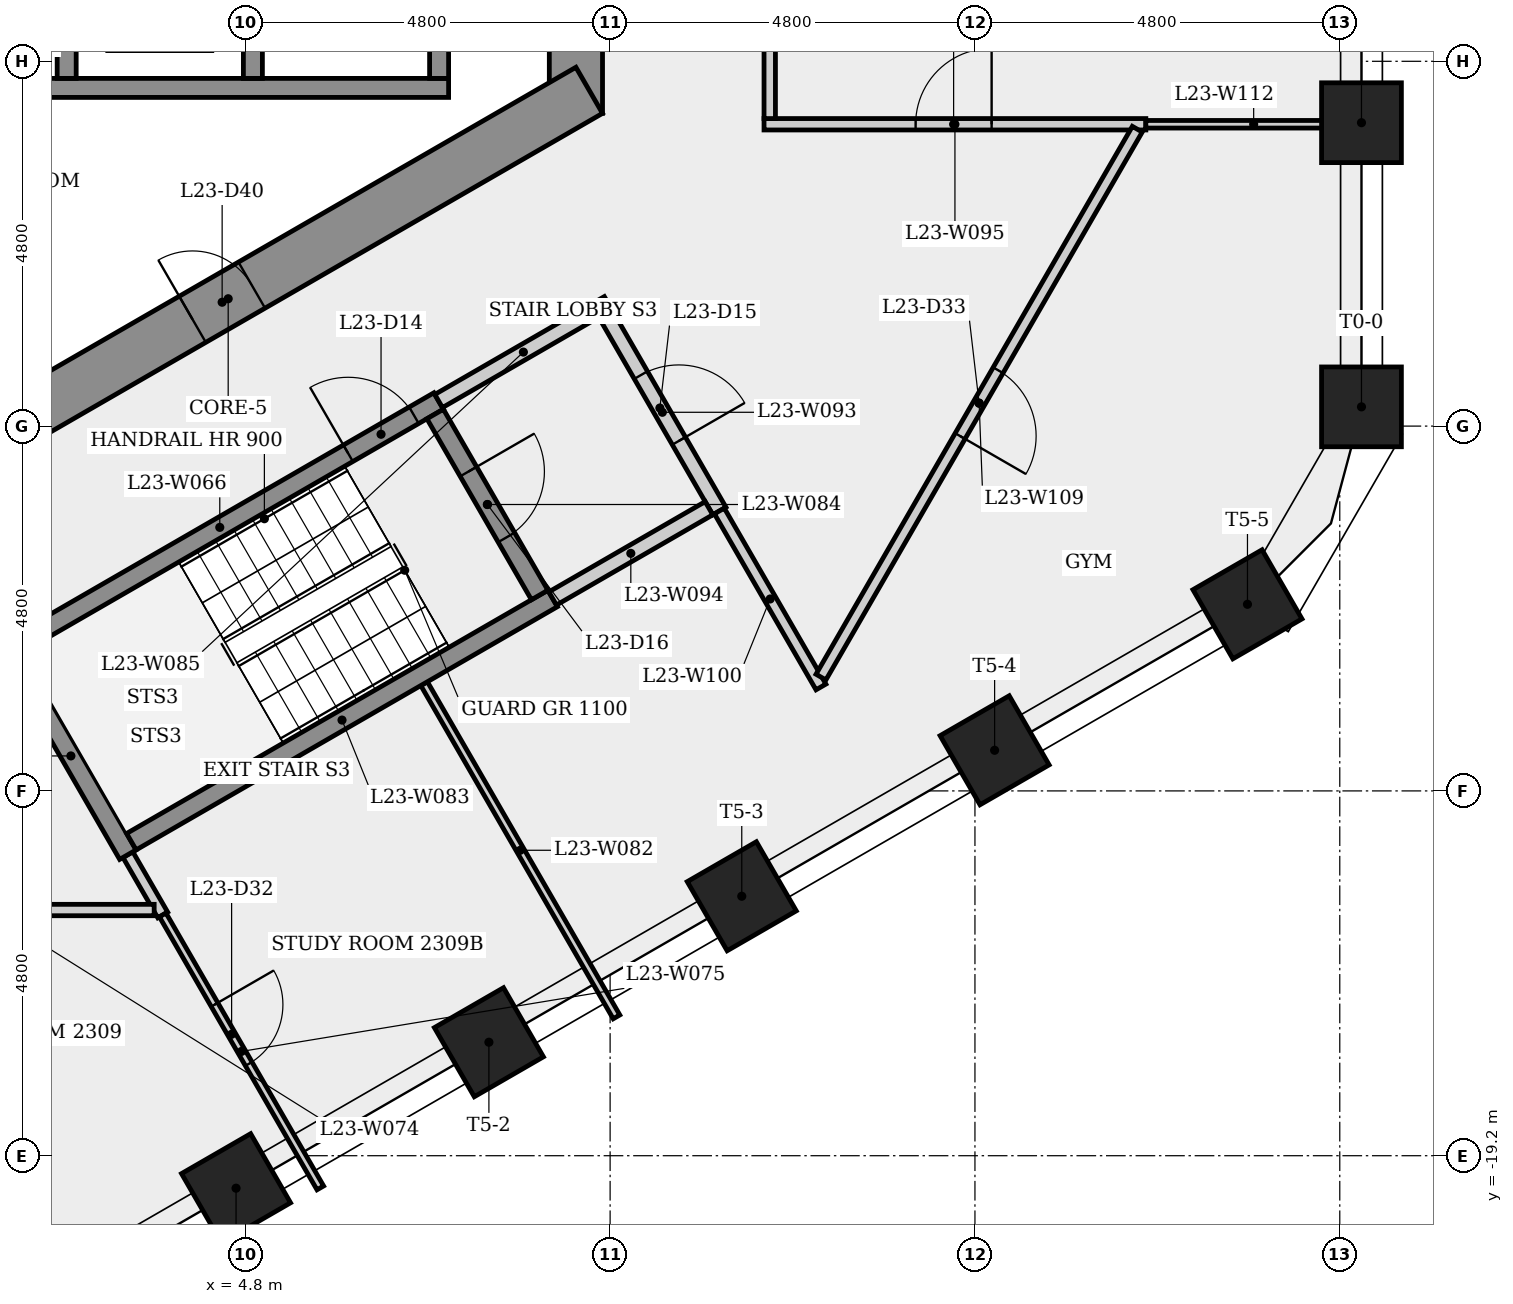
"""IFC4 building model, lengths in metres.
Left out: names, types, materials, properties, quantities, classifications, styles, units other than length and angle.
Written with IfcOpenShell. Run it as: python <this file> out.ifc"""

import sys

from ifc_helpers import new_model, si_unit, direction, frame, frame_2d, origin, origin_2d, place, context, subcontext, project, spatial, rectangle, extrude, element, fill, save


model = new_model("IFC4")
c1 = context("Model", 3, precision=1e-05, world=origin(), true_north=direction((0.0, 1.0)))
c2 = subcontext(c1, "Body", "Model", "MODEL_VIEW")
j1 = project(units=[si_unit("LENGTHUNIT", "METRE"), si_unit("PLANEANGLEUNIT", "RADIAN")], contexts=[c1])
p1 = place(None, origin())
s1 = spatial("IfcSite", under=j1, at=p1, CompositionType="ELEMENT")
p2 = place(p1, origin())
s2 = spatial("IfcBuilding", under=s1, at=p2, CompositionType="ELEMENT")
p3 = place(p2, frame((0.0, 0.0, 89.9)))
s3 = spatial("IfcBuildingStorey", under=s2, at=p3, CompositionType="ELEMENT", Elevation=89.9)
p4 = place(p3, frame((9.15, -5.485, 0.0), z_axis=(0.0, 0.0, 1.0), x_axis=(0.0, 1.0, 0.0)))
e1 = element("IfcWall", 1, at=p4, inside=s3, PredefinedType="SHEAR", context=c2, shape_type="SweptSolid", body=[
    extrude(rectangle(XDim=10.97, YDim=0.7, at=frame_2d((5.485, 0.0))), origin(), (0.0, 0.0, 1.0), 3.4),
])
p5 = place(p4, frame((4.685, 0.0, 0.0)))
e2 = element("IfcOpeningElement", 2, at=p5, cuts=e1, PredefinedType="OPENING", context=c2, shape_type="SweptSolid", body=[
    extrude(rectangle(XDim=1.6, YDim=2.1, at=frame_2d((0.8, 1.05))), frame((0.0, 0.36, 0.0), z_axis=(0.0, -1.0, 0.0), x_axis=(1.0, 0.0, 0.0)), (0.0, 0.0, 1.0), 0.72),
])
p6 = place(p3, frame((-0.175, -10.667, 0.0), z_axis=(0.0, 0.0, 1.0), x_axis=(0.866023993627, 0.500002442456, 0.0)))
e3 = element("IfcWall", 3, at=p6, inside=s3, PredefinedType="SHEAR", context=c2, shape_type="SweptSolid", body=[
    extrude(rectangle(XDim=10.97, YDim=0.7, at=frame_2d((5.485, 0.0))), origin(), (0.0, 0.0, 1.0), 3.4),
])
p7 = place(p6, frame((4.943, 0.0, 0.0)))
e4 = element("IfcOpeningElement", 4, at=p7, cuts=e3, PredefinedType="OPENING", context=c2, shape_type="SweptSolid", body=[
    extrude(rectangle(XDim=0.9, YDim=2.1, at=frame_2d((0.45, 1.05))), frame((0.0, 0.36, 0.0), z_axis=(0.0, -1.0, 0.0), x_axis=(1.0, 0.0, 0.0)), (0.0, 0.0, 1.0), 0.72),
])
for number, where, z_axis, x_axis in (
    (5, (19.486, -9.347, 0.0), (0.0, 0.0, 1.0), (1.0, 0.0, 0.0)),
    (6, (19.486, -5.608, 0.0), (0.0, 0.0, 1.0), (1.0, 0.0, 0.0)),
    (7, (4.678, -19.628, 0.0), (0.0, 0.0, 1.0), (0.5, -0.866, 0.0)),
    (8, (8.005, -17.707, 0.0), (0.0, 0.0, 1.0), (0.5, -0.866, 0.0)),
    (9, (11.332, -15.786, 0.0), (0.0, 0.0, 1.0), (0.5, -0.866, 0.0)),
    (10, (14.659, -13.865, 0.0), (0.0, 0.0, 1.0), (0.5, -0.866, 0.0)),
    (11, (17.986, -11.945, 0.0), (0.0, 0.0, 1.0), (0.5, -0.866, 0.0)),
):
    element("IfcColumn", number, at=place(p3, frame(where, z_axis=z_axis, x_axis=x_axis)), inside=s3, PredefinedType="COLUMN", context=c2, shape_type="SweptSolid", body=[
        extrude(rectangle(XDim=1.05, YDim=1.05, at=origin_2d()), origin(), (0.0, 0.0, 1.0), 3.4),
    ])
p8 = place(p3, frame((-7.225, -5.15, 0.0), z_axis=(0.0, 0.0, 1.0), x_axis=(1.0, 0.0, 0.0)))
e12 = element("IfcWall", 12, at=p8, inside=s3, PredefinedType="SHEAR", context=c2, shape_type="SweptSolid", body=[
    extrude(rectangle(XDim=14.7, YDim=0.25, at=frame_2d((7.35, 0.0))), origin(), (0.0, 0.0, 1.0), 3.05),
])
p9 = place(p3, frame((1.585, -12.595, 0.0), z_axis=(0.0, 0.0, 1.0), x_axis=(0.866036417653, 0.499980922934, 0.0)))
e13 = element("IfcWall", 13, at=p9, inside=s3, PredefinedType="SHEAR", context=c2, shape_type="SweptSolid", body=[
    extrude(rectangle(XDim=6.65, YDim=0.25, at=frame_2d((3.325, 0.0))), origin(), (0.0, 0.0, 1.0), 3.05),
])
p10 = place(p9, frame((5.275, 0.0, 0.0)))
e14 = element("IfcOpeningElement", 14, at=p10, cuts=e13, PredefinedType="OPENING", context=c2, shape_type="SweptSolid", body=[
    extrude(rectangle(XDim=1.0, YDim=2.1, at=frame_2d((0.5, 1.05))), frame((0.0, 0.135, 0.0), z_axis=(0.0, -1.0, 0.0), x_axis=(1.0, 0.0, 0.0)), (0.0, 0.0, 1.0), 0.27),
])
p11 = place(p3, frame((2.45, -1.925, 0.0), z_axis=(0.0, 0.0, 1.0), x_axis=(0.0, -1.0, 0.0)))
e15 = element("IfcWall", 15, at=p11, inside=s3, PredefinedType="SHEAR", context=c2, shape_type="SweptSolid", body=[
    extrude(rectangle(XDim=3.1, YDim=0.25, at=frame_2d((1.55, 0.0))), origin(), (0.0, 0.0, 1.0), 3.4),
])
p12 = place(p3, frame((3.256, -15.239, 0.0), z_axis=(0.0, 0.0, 1.0), x_axis=(0.499922376475, -0.866070215109, 0.0)))
e16 = element("IfcWall", 16, at=p12, inside=s3, PredefinedType="PARTITIONING", context=c2, shape_type="SweptSolid", body=[
    extrude(rectangle(XDim=0.916, YDim=0.15, at=frame_2d((0.458, 0.0))), origin(), (0.0, 0.0, 1.0), 3.05),
])
p13 = place(p3, frame((3.256, -15.239, 0.0), z_axis=(0.0, 0.0, 1.0), x_axis=(-0.50002537861, 0.866010750942, 0.0)))
e17 = element("IfcWall", 17, at=p13, inside=s3, PredefinedType="SHEAR", context=c2, shape_type="SweptSolid", body=[
    extrude(rectangle(XDim=3.0, YDim=0.25, at=frame_2d((1.5, 0.0))), origin(), (0.0, 0.0, 1.0), 3.05),
])
p14 = place(p3, frame((3.601, -15.967, 0.0), z_axis=(0.0, 0.0, 1.0), x_axis=(-1.0, 0.0, 0.0)))
e18 = element("IfcWall", 18, at=p14, inside=s3, PredefinedType="PARTITIONING", context=c2, shape_type="SweptSolid", body=[
    extrude(rectangle(XDim=4.381, YDim=0.15, at=frame_2d((2.19, 0.0))), origin(), (0.0, 0.0, 1.0), 3.05),
])
p15 = place(p14, frame((1.691, 0.0, 0.0)))
e19 = element("IfcOpeningElement", 19, at=p15, cuts=e18, PredefinedType="OPENING", context=c2, shape_type="SweptSolid", body=[
    extrude(rectangle(XDim=1.0, YDim=2.1, at=frame_2d((0.5, 1.05))), frame((0.0, 0.085, 0.0), z_axis=(0.0, -1.0, 0.0), x_axis=(1.0, 0.0, 0.0)), (0.0, 0.0, 1.0), 0.17),
])
p16 = place(p3, frame((3.714, -16.032, 0.0), z_axis=(0.0, 0.0, 1.0), x_axis=(0.500033333293, -0.866006157943, 0.0)))
e20 = element("IfcWall", 20, at=p16, inside=s3, PredefinedType="PARTITIONING", context=c2, shape_type="SweptSolid", body=[
    extrude(rectangle(XDim=4.147, YDim=0.1, at=frame_2d((2.073, 0.0))), origin(), (0.0, 0.0, 1.0), 3.05),
])
p17 = place(p16, frame((1.363, 0.0, 0.0)))
e21 = element("IfcOpeningElement", 21, at=p17, cuts=e20, PredefinedType="OPENING", context=c2, shape_type="SweptSolid", body=[
    extrude(rectangle(XDim=0.9, YDim=2.1, at=frame_2d((0.45, 1.05))), frame((0.0, 0.06, 0.0), z_axis=(0.0, -1.0, 0.0), x_axis=(1.0, 0.0, 0.0)), (0.0, 0.0, 1.0), 0.12),
])
p18 = place(p3, frame((4.9, -1.925, 0.0), z_axis=(0.0, 0.0, 1.0), x_axis=(0.0, -1.0, 0.0)))
e22 = element("IfcWall", 22, at=p18, inside=s3, PredefinedType="SHEAR", context=c2, shape_type="SweptSolid", body=[
    extrude(rectangle(XDim=3.1, YDim=0.25, at=frame_2d((1.55, 0.0))), origin(), (0.0, 0.0, 1.0), 3.4),
])
p19 = place(p3, frame((7.153, -12.989, 0.0), z_axis=(0.0, 0.0, 1.0), x_axis=(0.500013255511, -0.866017750576, 0.0)))
e23 = element("IfcWall", 23, at=p19, inside=s3, PredefinedType="PARTITIONING", context=c2, shape_type="SweptSolid", body=[
    extrude(rectangle(XDim=5.063, YDim=0.1, at=frame_2d((2.531, 0.0))), origin(), (0.0, 0.0, 1.0), 3.05),
])
p20 = place(p3, frame((3.301, -15.068, 0.0), z_axis=(0.0, 0.0, 1.0), x_axis=(0.866035036182, 0.499983315828, 0.0)))
e24 = element("IfcWall", 24, at=p20, inside=s3, PredefinedType="SHEAR", context=c2, shape_type="SweptSolid", body=[
    extrude(rectangle(XDim=6.4, YDim=0.25, at=frame_2d((3.2, 0.0))), origin(), (0.0, 0.0, 1.0), 3.05),
])
p21 = place(p3, frame((7.298, -9.441, 0.0), z_axis=(0.0, 0.0, 1.0), x_axis=(0.500034990121, -0.866005201286, 0.0)))
e25 = element("IfcWall", 25, at=p21, inside=s3, PredefinedType="SHEAR", context=c2, shape_type="SweptSolid", body=[
    extrude(rectangle(XDim=2.75, YDim=0.25, at=frame_2d((1.375, 0.0))), origin(), (0.0, 0.0, 1.0), 3.05),
])
p22 = place(p21, frame((0.875, 0.0, 0.0)))
e26 = element("IfcOpeningElement", 26, at=p22, cuts=e25, PredefinedType="OPENING", context=c2, shape_type="SweptSolid", body=[
    extrude(rectangle(XDim=1.0, YDim=2.1, at=frame_2d((0.5, 1.05))), frame((0.0, 0.135, 0.0), z_axis=(0.0, -1.0, 0.0), x_axis=(1.0, 0.0, 0.0)), (0.0, 0.0, 1.0), 0.27),
])
p23 = place(p3, frame((7.344, -9.27, 0.0), z_axis=(0.0, 0.0, 1.0), x_axis=(0.866005588531, 0.500034319456, 0.0)))
e27 = element("IfcWall", 27, at=p23, inside=s3, PredefinedType="PARTITIONING", context=c2, shape_type="SweptSolid", body=[
    extrude(rectangle(XDim=2.575, YDim=0.2, at=frame_2d((1.288, 0.0))), origin(), (0.0, 0.0, 1.0), 3.05),
])
p24 = place(p3, frame((7.35, -1.925, 0.0), z_axis=(0.0, 0.0, 1.0), x_axis=(0.0, -1.0, 0.0)))
e28 = element("IfcWall", 28, at=p24, inside=s3, PredefinedType="SHEAR", context=c2, shape_type="SweptSolid", body=[
    extrude(rectangle(XDim=3.1, YDim=0.25, at=frame_2d((1.55, 0.0))), origin(), (0.0, 0.0, 1.0), 3.4),
])
p25 = place(p3, frame((9.537, -8.119, 0.0), z_axis=(0.0, 0.0, 1.0), x_axis=(0.499990139034, -0.866031096941, 0.0)))
e29 = element("IfcWall", 29, at=p25, inside=s3, PredefinedType="PARTITIONING", context=c2, shape_type="SweptSolid", body=[
    extrude(rectangle(XDim=3.0, YDim=0.2, at=frame_2d((1.5, 0.0))), origin(), (0.0, 0.0, 1.0), 3.05),
])
p26 = place(p25, frame((0.935, 0.0, 0.0)))
e30 = element("IfcOpeningElement", 30, at=p26, cuts=e29, PredefinedType="OPENING", context=c2, shape_type="SweptSolid", body=[
    extrude(rectangle(XDim=1.0, YDim=2.1, at=frame_2d((0.5, 1.05))), frame((0.0, 0.11, 0.0), z_axis=(0.0, -1.0, 0.0), x_axis=(1.0, 0.0, 0.0)), (0.0, 0.0, 1.0), 0.22),
])
p27 = place(p3, frame((10.901, -10.681, 0.0), z_axis=(0.0, 0.0, 1.0), x_axis=(-0.866007538022, -0.500030943131, 0.0)))
e31 = element("IfcWall", 31, at=p27, inside=s3, PredefinedType="PARTITIONING", context=c2, shape_type="SweptSolid", body=[
    extrude(rectangle(XDim=2.375, YDim=0.2, at=frame_2d((1.188, 0.0))), origin(), (0.0, 0.0, 1.0), 3.05),
])
p28 = place(p3, frame((11.625, -5.628, 0.0), z_axis=(0.0, 0.0, 1.0), x_axis=(1.0, 0.0, 0.0)))
e32 = element("IfcWall", 32, at=p28, inside=s3, PredefinedType="PARTITIONING", context=c2, shape_type="SweptSolid", body=[
    extrude(rectangle(XDim=5.023, YDim=0.15, at=frame_2d((2.512, 0.0))), origin(), (0.0, 0.0, 1.0), 3.05),
])
p29 = place(p28, frame((1.994, 0.0, 0.0)))
e33 = element("IfcOpeningElement", 33, at=p29, cuts=e32, PredefinedType="OPENING", context=c2, shape_type="SweptSolid", body=[
    extrude(rectangle(XDim=1.0, YDim=2.1, at=frame_2d((0.5, 1.05))), frame((0.0, 0.085, 0.0), z_axis=(0.0, -1.0, 0.0), x_axis=(1.0, 0.0, 0.0)), (0.0, 0.0, 1.0), 0.17),
])
p30 = place(p3, frame((11.7, -5.553, 0.0), z_axis=(0.0, 0.0, 1.0), x_axis=(0.0, 1.0, 0.0)))
e34 = element("IfcWall", 34, at=p30, inside=s3, PredefinedType="PARTITIONING", context=c2, shape_type="SweptSolid", body=[
    extrude(rectangle(XDim=10.757, YDim=0.15, at=frame_2d((5.378, 0.0))), origin(), (0.0, 0.0, 1.0), 3.05),
])
p31 = place(p30, frame((5.053, 0.0, 0.0)))
e35 = element("IfcOpeningElement", 35, at=p31, cuts=e34, PredefinedType="OPENING", context=c2, shape_type="SweptSolid", body=[
    extrude(rectangle(XDim=1.0, YDim=2.1, at=frame_2d((0.5, 1.05))), frame((0.0, 0.085, 0.0), z_axis=(0.0, -1.0, 0.0), x_axis=(1.0, 0.0, 0.0)), (0.0, 0.0, 1.0), 0.17),
])
p32 = place(p3, frame((12.374, -13.032, 0.0), z_axis=(0.0, 0.0, 1.0), x_axis=(-0.499999136801, 0.866025902152, 0.0)))
e36 = element("IfcWall", 36, at=p32, inside=s3, PredefinedType="PARTITIONING", context=c2, shape_type="SweptSolid", body=[
    extrude(rectangle(XDim=2.673, YDim=0.15, at=frame_2d((1.337, 0.0))), origin(), (0.0, 0.0, 1.0), 3.05),
])
p33 = place(p3, frame((16.536, -5.694, 0.0), z_axis=(0.0, 0.0, 1.0), x_axis=(-0.49999073022, -0.866030755628, 0.0)))
e37 = element("IfcWall", 37, at=p33, inside=s3, PredefinedType="PARTITIONING", context=c2, shape_type="SweptSolid", body=[
    extrude(rectangle(XDim=8.324, YDim=0.15, at=frame_2d((4.162, 0.0))), origin(), (0.0, 0.0, 1.0), 3.05),
])
p34 = place(p33, frame((3.662, 0.0, 0.0)))
e38 = element("IfcOpeningElement", 38, at=p34, cuts=e37, PredefinedType="OPENING", context=c2, shape_type="SweptSolid", body=[
    extrude(rectangle(XDim=1.0, YDim=2.1, at=frame_2d((0.5, 1.05))), frame((0.0, 0.085, 0.0), z_axis=(0.0, -1.0, 0.0), x_axis=(1.0, 0.0, 0.0)), (0.0, 0.0, 1.0), 0.17),
])
p35 = place(p3, frame((19.486, -5.628, 0.0), z_axis=(0.0, 0.0, 1.0), x_axis=(-1.0, 0.0, 0.0)))
e39 = element("IfcWall", 39, at=p35, inside=s3, PredefinedType="PARTITIONING", context=c2, shape_type="SweptSolid", body=[
    extrude(rectangle(XDim=2.837, YDim=0.1, at=frame_2d((1.418, 0.0))), origin(), (0.0, 0.0, 1.0), 3.05),
])
p36 = place(p10, origin())
e40 = element("IfcDoor", 40, at=p36, inside=s3, OperationType="SINGLE_SWING_LEFT", PredefinedType="DOOR", context=c2, shape_type="SweptSolid", body=[
    extrude(rectangle(XDim=1.0, YDim=2.1, at=frame_2d((0.5, 1.05))), frame((0.0, 0.025, 0.0), z_axis=(0.0, -1.0, 0.0), x_axis=(1.0, 0.0, 0.0)), (0.0, 0.0, 1.0), 0.05),
])
fill(e14, e40)
p37 = place(p26, origin())
e41 = element("IfcDoor", 41, at=p37, inside=s3, OperationType="SINGLE_SWING_RIGHT", PredefinedType="DOOR", context=c2, shape_type="SweptSolid", body=[
    extrude(rectangle(XDim=1.0, YDim=2.1, at=frame_2d((0.5, 1.05))), frame((0.0, 0.025, 0.0), z_axis=(0.0, -1.0, 0.0), x_axis=(1.0, 0.0, 0.0)), (0.0, 0.0, 1.0), 0.05),
])
fill(e30, e41)
p38 = place(p22, origin())
e42 = element("IfcDoor", 42, at=p38, inside=s3, OperationType="SINGLE_SWING_LEFT", PredefinedType="DOOR", context=c2, shape_type="SweptSolid", body=[
    extrude(rectangle(XDim=1.0, YDim=2.1, at=frame_2d((0.5, 1.05))), frame((0.0, 0.025, 0.0), z_axis=(0.0, -1.0, 0.0), x_axis=(1.0, 0.0, 0.0)), (0.0, 0.0, 1.0), 0.05),
])
fill(e26, e42)
p39 = place(p29, origin())
e43 = element("IfcDoor", 43, at=p39, inside=s3, OperationType="SINGLE_SWING_RIGHT", PredefinedType="DOOR", context=c2, shape_type="SweptSolid", body=[
    extrude(rectangle(XDim=1.0, YDim=2.1, at=frame_2d((0.5, 1.05))), frame((0.0, 0.025, 0.0), z_axis=(0.0, -1.0, 0.0), x_axis=(1.0, 0.0, 0.0)), (0.0, 0.0, 1.0), 0.05),
])
fill(e33, e43)
p40 = place(p17, origin())
e44 = element("IfcDoor", 44, at=p40, inside=s3, OperationType="SINGLE_SWING_LEFT", PredefinedType="DOOR", context=c2, shape_type="SweptSolid", body=[
    extrude(rectangle(XDim=0.9, YDim=2.1, at=frame_2d((0.45, 1.05))), frame((0.0, 0.025, 0.0), z_axis=(0.0, -1.0, 0.0), x_axis=(1.0, 0.0, 0.0)), (0.0, 0.0, 1.0), 0.05),
])
fill(e21, e44)
p41 = place(p34, origin())
e45 = element("IfcDoor", 45, at=p41, inside=s3, OperationType="SINGLE_SWING_RIGHT", PredefinedType="DOOR", context=c2, shape_type="SweptSolid", body=[
    extrude(rectangle(XDim=1.0, YDim=2.1, at=frame_2d((0.5, 1.05))), frame((0.0, 0.025, 0.0), z_axis=(0.0, -1.0, 0.0), x_axis=(1.0, 0.0, 0.0)), (0.0, 0.0, 1.0), 0.05),
])
fill(e38, e45)
p42 = place(p7, origin())
e46 = element("IfcDoor", 46, at=p42, inside=s3, OperationType="SINGLE_SWING_LEFT", PredefinedType="DOOR", context=c2, shape_type="SweptSolid", body=[
    extrude(rectangle(XDim=0.9, YDim=2.1, at=frame_2d((0.45, 1.05))), frame((0.0, 0.025, 0.0), z_axis=(0.0, -1.0, 0.0), x_axis=(1.0, 0.0, 0.0)), (0.0, 0.0, 1.0), 0.05),
])
fill(e4, e46)
save(model, sys.argv[1])
